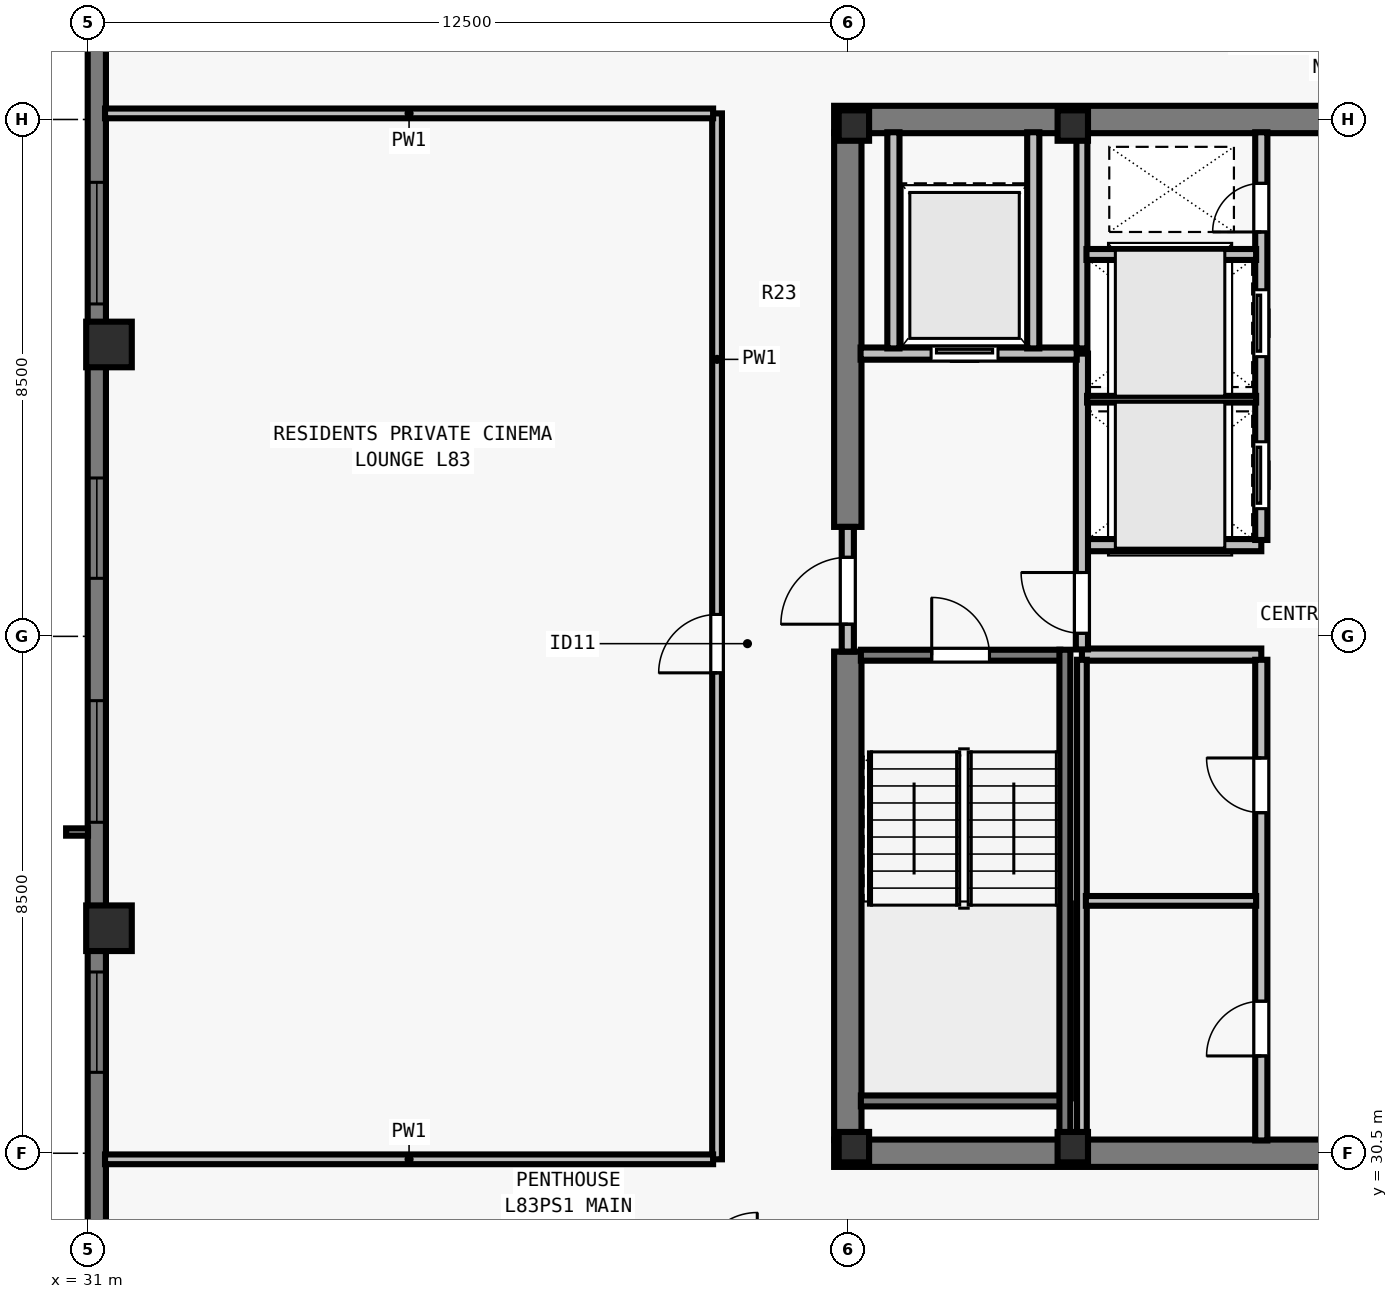
"""IFC4 building model, lengths in metres.
Left out: names, types, materials, properties, quantities, classifications, styles, units other than length and angle.
Written with IfcOpenShell. Run it as: python <this file> out.ifc"""

import sys

from ifc_helpers import new_model, si_unit, direction, frame, frame_2d, origin, origin_2d, place, context, subcontext, project, spatial, rectangle, i_section, extrude, element, fill, save


model = new_model("IFC4")
c1 = context("Model", 3, precision=1e-05, world=origin(), true_north=direction((0.0, 1.0)))
c2 = subcontext(c1, "Body", "Model", "MODEL_VIEW")
j1 = project(units=[si_unit("LENGTHUNIT", "METRE"), si_unit("PLANEANGLEUNIT", "RADIAN")], contexts=[c1])
p1 = place(None, origin())
s1 = spatial("IfcSite", under=j1, at=p1, CompositionType="ELEMENT")
p2 = place(p1, origin())
s2 = spatial("IfcBuilding", under=s1, at=p2, CompositionType="ELEMENT")
p3 = place(p2, frame((0.0, 0.0, 301.5)))
s3 = spatial("IfcBuildingStorey", under=s2, at=p3, CompositionType="ELEMENT", Elevation=301.5)
for number, where, z_axis, x_axis in (
    (1, (43.6, 30.6, 0.0), (0.0, 0.0, 1.0), (1.0, 0.0, 0.0)),
    (2, (47.2, 30.6, 0.0), (0.0, 0.0, 1.0), (1.0, 0.0, 0.0)),
    (3, (43.6, 47.4, 0.0), (0.0, 0.0, 1.0), (1.0, 0.0, 0.0)),
    (4, (47.2, 47.4, 0.0), (0.0, 0.0, 1.0), (1.0, 0.0, 0.0)),
):
    element("IfcColumn", number, at=place(p3, frame(where, z_axis=z_axis, x_axis=x_axis)), inside=s3, PredefinedType="COLUMN", context=c2, shape_type="SweptSolid", body=[
        extrude(i_section(OverallWidth=0.5, OverallDepth=0.5, WebThickness=0.028, FlangeThickness=0.045, at=origin_2d()), origin(), (0.0, 0.0, 1.0), 3.5),
    ])
for number, where, z_axis, x_axis in (
    (5, (31.35, 43.8, 0.0), (0.0, 0.0, 1.0), (0.0, 1.0, 0.0)),
    (6, (31.35, 34.2, 0.0), (0.0, 0.0, 1.0), (0.0, 1.0, 0.0)),
):
    element("IfcColumn", number, at=place(p3, frame(where, z_axis=z_axis, x_axis=x_axis)), inside=s3, PredefinedType="COLUMN", context=c2, shape_type="SweptSolid", body=[
        extrude(rectangle(XDim=0.75, YDim=0.75, at=origin_2d()), origin(), (0.0, 0.0, 1.0), 3.5),
    ])
p4 = place(p3, frame((31.15, 23.5, 0.0), z_axis=(0.0, 0.0, 1.0), x_axis=(0.0, 1.0, 0.0)))
e7 = element("IfcWall", 7, at=p4, inside=s3, PredefinedType="SOLIDWALL", context=c2, shape_type="SweptSolid", body=[
    extrude(rectangle(XDim=30.722, YDim=0.3, at=frame_2d((15.361, 0.0))), origin(), (0.0, 0.0, 1.0), 3.29),
])
p5 = place(p4, frame((8.331, 0.0, 0.8)))
e8 = element("IfcOpeningElement", 8, at=p5, cuts=e7, PredefinedType="OPENING", context=c2, shape_type="SweptSolid", body=[
    extrude(rectangle(XDim=1.65, YDim=1.758, at=frame_2d((0.825, 0.879))), frame((0.0, 0.16, 0.0), z_axis=(0.0, -1.0, 0.0), x_axis=(1.0, 0.0, 0.0)), (0.0, 0.0, 1.0), 0.32),
])
p6 = place(p4, frame((12.442, 0.0, 0.8)))
e9 = element("IfcOpeningElement", 9, at=p6, cuts=e7, PredefinedType="OPENING", context=c2, shape_type="SweptSolid", body=[
    extrude(rectangle(XDim=2.0, YDim=1.758, at=frame_2d((1.0, 0.879))), frame((0.0, 0.16, 0.0), z_axis=(0.0, -1.0, 0.0), x_axis=(1.0, 0.0, 0.0)), (0.0, 0.0, 1.0), 0.32),
])
p7 = place(p4, frame((16.455, 0.0, 0.8)))
e10 = element("IfcOpeningElement", 10, at=p7, cuts=e7, PredefinedType="OPENING", context=c2, shape_type="SweptSolid", body=[
    extrude(rectangle(XDim=1.65, YDim=1.758, at=frame_2d((0.825, 0.879))), frame((0.0, 0.16, 0.0), z_axis=(0.0, -1.0, 0.0), x_axis=(1.0, 0.0, 0.0)), (0.0, 0.0, 1.0), 0.32),
])
p8 = place(p4, frame((20.967, 0.0, 0.8)))
e11 = element("IfcOpeningElement", 11, at=p8, cuts=e7, PredefinedType="OPENING", context=c2, shape_type="SweptSolid", body=[
    extrude(rectangle(XDim=2.0, YDim=1.758, at=frame_2d((1.0, 0.879))), frame((0.0, 0.16, 0.0), z_axis=(0.0, -1.0, 0.0), x_axis=(1.0, 0.0, 0.0)), (0.0, 0.0, 1.0), 0.32),
])
for number, where, z_axis, x_axis in (
    (12, (43.275, 30.5, 0.0), (0.0, 0.0, 1.0), (1.0, 0.0, 0.0)),
    (13, (43.275, 47.5, 0.0), (0.0, 0.0, 1.0), (1.0, 0.0, 0.0)),
):
    element("IfcWall", number, at=place(p3, frame(where, z_axis=z_axis, x_axis=x_axis)), inside=s3, PredefinedType="SHEAR", context=c2, shape_type="SweptSolid", body=[
        extrude(rectangle(XDim=17.45, YDim=0.45, at=frame_2d((8.725, 0.0))), origin(), (0.0, 0.0, 1.0), 3.29),
    ])
p9 = place(p3, frame((43.5, 30.715, 0.0), z_axis=(0.0, 0.0, 1.0), x_axis=(0.0, 1.0, 0.0)))
e14 = element("IfcWall", 14, at=p9, inside=s3, PredefinedType="SHEAR", context=c2, shape_type="SweptSolid", body=[
    extrude(rectangle(XDim=8.035, YDim=0.45, at=frame_2d((4.018, 0.0))), origin(), (0.0, 0.0, 1.0), 3.29),
])
p10 = place(p3, frame((43.5, 40.8, 0.0), z_axis=(0.0, 0.0, 1.0), x_axis=(0.0, 1.0, 0.0)))
e15 = element("IfcWall", 15, at=p10, inside=s3, PredefinedType="SHEAR", context=c2, shape_type="SweptSolid", body=[
    extrude(rectangle(XDim=6.485, YDim=0.45, at=frame_2d((3.242, 0.0))), origin(), (0.0, 0.0, 1.0), 3.29),
])
for number, where, z_axis, x_axis in (
    (16, (47.35, 38.7, 0.0), (0.0, 0.0, 1.0), (1.0, 0.0, 0.0)),
    (17, (47.35, 40.5, 0.0), (0.0, 0.0, 1.0), (1.0, 0.0, 0.0)),
):
    element("IfcWall", number, at=place(p3, frame(where, z_axis=z_axis, x_axis=x_axis)), inside=s3, PredefinedType="SOLIDWALL", context=c2, shape_type="SweptSolid", body=[
        extrude(rectangle(XDim=2.95, YDim=0.2, at=frame_2d((1.475, 0.0))), origin(), (0.0, 0.0, 1.0), 3.29),
    ])
p11 = place(p3, frame((50.3, 30.71, 0.0), z_axis=(0.0, 0.0, 1.0), x_axis=(0.0, 1.0, 0.0)))
e18 = element("IfcWall", 18, at=p11, inside=s3, PredefinedType="SOLIDWALL", context=c2, shape_type="SweptSolid", body=[
    extrude(rectangle(XDim=7.905, YDim=0.2, at=frame_2d((3.953, 0.0))), origin(), (0.0, 0.0, 1.0), 3.29),
])
p12 = place(p11, frame((1.39, 0.0, 0.0)))
e19 = element("IfcOpeningElement", 19, at=p12, cuts=e18, PredefinedType="OPENING", context=c2, shape_type="SweptSolid", body=[
    extrude(rectangle(XDim=0.9, YDim=2.12, at=frame_2d((0.45, 1.06))), frame((0.0, 0.11, 0.0), z_axis=(0.0, -1.0, 0.0), x_axis=(1.0, 0.0, 0.0)), (0.0, 0.0, 1.0), 0.22),
])
p13 = place(p11, frame((5.39, 0.0, 0.0)))
e20 = element("IfcOpeningElement", 20, at=p13, cuts=e18, PredefinedType="OPENING", context=c2, shape_type="SweptSolid", body=[
    extrude(rectangle(XDim=0.9, YDim=2.12, at=frame_2d((0.45, 1.06))), frame((0.0, 0.11, 0.0), z_axis=(0.0, -1.0, 0.0), x_axis=(1.0, 0.0, 0.0)), (0.0, 0.0, 1.0), 0.22),
])
p14 = place(p3, frame((50.3, 40.585, 0.0), z_axis=(0.0, 0.0, 1.0), x_axis=(0.0, 1.0, 0.0)))
e21 = element("IfcWall", 21, at=p14, inside=s3, PredefinedType="SOLIDWALL", context=c2, shape_type="SweptSolid", body=[
    extrude(rectangle(XDim=6.705, YDim=0.2, at=frame_2d((3.353, 0.0))), origin(), (0.0, 0.0, 1.0), 3.29),
])
p15 = place(p14, frame((0.515, 0.0, 0.0)))
e22 = element("IfcOpeningElement", 22, at=p15, cuts=e21, PredefinedType="OPENING", context=c2, shape_type="SweptSolid", body=[
    extrude(rectangle(XDim=1.1, YDim=2.2, at=frame_2d((0.55, 1.1))), frame((0.0, 0.11, 0.0), z_axis=(0.0, -1.0, 0.0), x_axis=(1.0, 0.0, 0.0)), (0.0, 0.0, 1.0), 0.22),
])
p16 = place(p14, frame((3.015, 0.0, 0.0)))
e23 = element("IfcOpeningElement", 23, at=p16, cuts=e21, PredefinedType="OPENING", context=c2, shape_type="SweptSolid", body=[
    extrude(rectangle(XDim=1.1, YDim=2.2, at=frame_2d((0.55, 1.1))), frame((0.0, 0.11, 0.0), z_axis=(0.0, -1.0, 0.0), x_axis=(1.0, 0.0, 0.0)), (0.0, 0.0, 1.0), 0.22),
])
p17 = place(p14, frame((5.065, 0.0, 0.0)))
e24 = element("IfcOpeningElement", 24, at=p17, cuts=e21, PredefinedType="OPENING", context=c2, shape_type="SweptSolid", body=[
    extrude(rectangle(XDim=0.8, YDim=2.08, at=frame_2d((0.4, 1.04))), frame((0.0, 0.11, 0.0), z_axis=(0.0, -1.0, 0.0), x_axis=(1.0, 0.0, 0.0)), (0.0, 0.0, 1.0), 0.22),
])
p18 = place(p3, frame((43.5, 38.75, 0.0), z_axis=(0.0, 0.0, 1.0), x_axis=(0.0, 1.0, 0.0)))
e25 = element("IfcWall", 25, at=p18, inside=s3, PredefinedType="SOLIDWALL", context=c2, shape_type="SweptSolid", body=[
    extrude(rectangle(XDim=2.05, YDim=0.2, at=frame_2d((1.025, 0.0))), origin(), (0.0, 0.0, 1.0), 3.29),
])
p19 = place(p18, frame((0.45, 0.0, 0.0)))
e26 = element("IfcOpeningElement", 26, at=p19, cuts=e25, PredefinedType="OPENING", context=c2, shape_type="SweptSolid", body=[
    extrude(rectangle(XDim=1.1, YDim=2.15, at=frame_2d((0.55, 1.075))), frame((0.0, 0.11, 0.0), z_axis=(0.0, -1.0, 0.0), x_axis=(1.0, 0.0, 0.0)), (0.0, 0.0, 1.0), 0.22),
])
p20 = place(p3, frame((47.35, 38.785, 0.0), z_axis=(0.0, 0.0, 1.0), x_axis=(0.0, 1.0, 0.0)))
e27 = element("IfcWall", 27, at=p20, inside=s3, PredefinedType="SOLIDWALL", context=c2, shape_type="SweptSolid", body=[
    extrude(rectangle(XDim=4.865, YDim=0.2, at=frame_2d((2.433, 0.0))), origin(), (0.0, 0.0, 1.0), 3.29),
])
p21 = place(p20, frame((0.265, 0.0, 0.0)))
e28 = element("IfcOpeningElement", 28, at=p21, cuts=e27, PredefinedType="OPENING", context=c2, shape_type="SweptSolid", body=[
    extrude(rectangle(XDim=1.0, YDim=2.15, at=frame_2d((0.5, 1.075))), frame((0.0, 0.11, 0.0), z_axis=(0.0, -1.0, 0.0), x_axis=(1.0, 0.0, 0.0)), (0.0, 0.0, 1.0), 0.22),
])
p22 = place(p3, frame((43.71, 43.65, 0.0), z_axis=(0.0, 0.0, 1.0), x_axis=(1.0, 0.0, 0.0)))
e29 = element("IfcWall", 29, at=p22, inside=s3, PredefinedType="SOLIDWALL", context=c2, shape_type="SweptSolid", body=[
    extrude(rectangle(XDim=3.555, YDim=0.2, at=frame_2d((1.777, 0.0))), origin(), (0.0, 0.0, 1.0), 3.29),
])
p23 = place(p22, frame((1.16, 0.0, 0.0)))
e30 = element("IfcOpeningElement", 30, at=p23, cuts=e29, PredefinedType="OPENING", context=c2, shape_type="SweptSolid", body=[
    extrude(rectangle(XDim=1.1, YDim=2.2, at=frame_2d((0.55, 1.1))), frame((0.0, 0.11, 0.0), z_axis=(0.0, -1.0, 0.0), x_axis=(1.0, 0.0, 0.0)), (0.0, 0.0, 1.0), 0.22),
])
for number, where, z_axis, x_axis in (
    (31, (46.55, 43.735, 0.0), (0.0, 0.0, 1.0), (0.0, 1.0, 0.0)),
    (32, (44.25, 43.735, 0.0), (0.0, 0.0, 1.0), (0.0, 1.0, 0.0)),
):
    element("IfcWall", number, at=place(p3, frame(where, z_axis=z_axis, x_axis=x_axis)), inside=s3, PredefinedType="SOLIDWALL", context=c2, shape_type="SweptSolid", body=[
        extrude(rectangle(XDim=3.555, YDim=0.2, at=frame_2d((1.777, 0.0))), origin(), (0.0, 0.0, 1.0), 3.29),
    ])
p24 = place(p3, frame((47.35, 30.71, 0.0), z_axis=(0.0, 0.0, 1.0), x_axis=(0.0, 1.0, 0.0)))
e33 = element("IfcWall", 33, at=p24, inside=s3, PredefinedType="PARTITIONING", context=c2, shape_type="SweptSolid", body=[
    extrude(rectangle(XDim=7.905, YDim=0.16, at=frame_2d((3.953, 0.0))), origin(), (0.0, 0.0, 1.0), 3.29),
])
p25 = place(p3, frame((47.415, 34.65, 0.0), z_axis=(0.0, 0.0, 1.0), x_axis=(1.0, 0.0, 0.0)))
e34 = element("IfcWall", 34, at=p25, inside=s3, PredefinedType="PARTITIONING", context=c2, shape_type="SweptSolid", body=[
    extrude(rectangle(XDim=2.8, YDim=0.16, at=frame_2d((1.4, 0.0))), origin(), (0.0, 0.0, 1.0), 3.29),
])
p26 = place(p3, frame((47.35, 43.735, 0.0), z_axis=(0.0, 0.0, 1.0), x_axis=(0.0, 1.0, 0.0)))
e35 = element("IfcWall", 35, at=p26, inside=s3, PredefinedType="SOLIDWALL", context=c2, shape_type="SweptSolid", body=[
    extrude(rectangle(XDim=3.555, YDim=0.18, at=frame_2d((1.777, 0.0))), origin(), (0.0, 0.0, 1.0), 3.29),
])
p27 = place(p3, frame((47.435, 42.9, 0.0), z_axis=(0.0, 0.0, 1.0), x_axis=(1.0, 0.0, 0.0)))
e36 = element("IfcWall", 36, at=p27, inside=s3, PredefinedType="PARTITIONING", context=c2, shape_type="SweptSolid", body=[
    extrude(rectangle(XDim=2.78, YDim=0.11, at=frame_2d((1.39, 0.0))), origin(), (0.0, 0.0, 1.0), 3.29),
])
p28 = place(p3, frame((47.425, 45.28, 0.0), z_axis=(0.0, 0.0, 1.0), x_axis=(1.0, 0.0, 0.0)))
e37 = element("IfcWall", 37, at=p28, inside=s3, PredefinedType="SOLIDWALL", context=c2, shape_type="SweptSolid", body=[
    extrude(rectangle(XDim=2.79, YDim=0.18, at=frame_2d((1.395, 0.0))), origin(), (0.0, 0.0, 1.0), 3.29),
])
p29 = place(p3, frame((41.35, 30.4, 0.0), z_axis=(0.0, 0.0, 1.0), x_axis=(0.0, 1.0, 0.0)))
e38 = element("IfcWall", 38, at=p29, inside=s3, PredefinedType="PARTITIONING", context=c2, shape_type="SweptSolid", body=[
    extrude(rectangle(XDim=17.2, YDim=0.16, at=frame_2d((8.6, 0.0))), origin(), (0.0, 0.0, 1.0), 3.009),
])
p30 = place(p29, frame((8.0, 0.0, 0.0)))
e39 = element("IfcOpeningElement", 39, at=p30, cuts=e38, PredefinedType="OPENING", context=c2, shape_type="SweptSolid", body=[
    extrude(rectangle(XDim=0.96, YDim=2.12, at=frame_2d((0.48, 1.06))), frame((0.0, 0.09, 0.0), z_axis=(0.0, -1.0, 0.0), x_axis=(1.0, 0.0, 0.0)), (0.0, 0.0, 1.0), 0.18),
])
for number, where, z_axis, x_axis in (
    (40, (31.285, 30.4, 0.0), (0.0, 0.0, 1.0), (1.0, 0.0, 0.0)),
    (41, (31.285, 47.6, 0.0), (0.0, 0.0, 1.0), (1.0, 0.0, 0.0)),
):
    element("IfcWall", number, at=place(p3, frame(where, z_axis=z_axis, x_axis=x_axis)), inside=s3, PredefinedType="PARTITIONING", context=c2, shape_type="SweptSolid", body=[
        extrude(rectangle(XDim=10.0, YDim=0.16, at=frame_2d((5.0, 0.0))), origin(), (0.0, 0.0, 1.0), 3.29),
    ])
p31 = place(p3, frame((43.715, 38.69, 0.0), z_axis=(0.0, 0.0, 1.0), x_axis=(1.0, 0.0, 0.0)))
e42 = element("IfcWall", 42, at=p31, inside=s3, PredefinedType="SOLIDWALL", context=c2, shape_type="SweptSolid", body=[
    extrude(rectangle(XDim=3.28, YDim=0.18, at=frame_2d((1.64, 0.0))), origin(), (0.0, 0.0, 1.0), 3.29),
])
p32 = place(p31, frame((1.165, 0.0, 0.0)))
e43 = element("IfcOpeningElement", 43, at=p32, cuts=e42, PredefinedType="OPENING", context=c2, shape_type="SweptSolid", body=[
    extrude(rectangle(XDim=0.95, YDim=2.15, at=frame_2d((0.475, 1.075))), frame((0.0, 0.1, 0.0), z_axis=(0.0, -1.0, 0.0), x_axis=(1.0, 0.0, 0.0)), (0.0, 0.0, 1.0), 0.2),
])
p33 = place(p3, frame((43.715, 31.36, 0.0), z_axis=(0.0, 0.0, 1.0), x_axis=(1.0, 0.0, 0.0)))
e44 = element("IfcWall", 44, at=p33, inside=s3, PredefinedType="SOLIDWALL", context=c2, shape_type="SweptSolid", body=[
    extrude(rectangle(XDim=3.28, YDim=0.18, at=frame_2d((1.64, 0.0))), origin(), (0.0, 0.0, 1.0), 3.29),
])
p34 = place(p3, frame((47.07, 38.78, 0.0), z_axis=(0.0, 0.0, 1.0), x_axis=(0.0, -1.0, 0.0)))
e45 = element("IfcWall", 45, at=p34, inside=s3, PredefinedType="SOLIDWALL", context=c2, shape_type="SweptSolid", body=[
    extrude(rectangle(XDim=8.067, YDim=0.18, at=frame_2d((4.034, 0.0))), origin(), (0.0, 0.0, 1.0), 3.29),
])
p35 = place(p5, origin())
e46 = element("IfcWindow", 46, at=p35, inside=s3, PartitioningType="SINGLE_PANEL", PredefinedType="WINDOW", context=c2, shape_type="SweptSolid", body=[
    extrude(rectangle(XDim=1.65, YDim=1.758, at=frame_2d((0.825, 0.879))), frame((0.0, -0.05, 0.0), z_axis=(0.0, -1.0, 0.0), x_axis=(1.0, 0.0, 0.0)), (0.0, 0.0, 1.0), 0.06),
])
fill(e8, e46)
p36 = place(p6, origin())
e47 = element("IfcWindow", 47, at=p36, inside=s3, PartitioningType="SINGLE_PANEL", PredefinedType="WINDOW", context=c2, shape_type="SweptSolid", body=[
    extrude(rectangle(XDim=2.0, YDim=1.758, at=frame_2d((1.0, 0.879))), frame((0.0, -0.05, 0.0), z_axis=(0.0, -1.0, 0.0), x_axis=(1.0, 0.0, 0.0)), (0.0, 0.0, 1.0), 0.06),
])
fill(e9, e47)
p37 = place(p7, origin())
e48 = element("IfcWindow", 48, at=p37, inside=s3, PartitioningType="SINGLE_PANEL", PredefinedType="WINDOW", context=c2, shape_type="SweptSolid", body=[
    extrude(rectangle(XDim=1.65, YDim=1.758, at=frame_2d((0.825, 0.879))), frame((0.0, -0.05, 0.0), z_axis=(0.0, -1.0, 0.0), x_axis=(1.0, 0.0, 0.0)), (0.0, 0.0, 1.0), 0.06),
])
fill(e10, e48)
p38 = place(p8, origin())
e49 = element("IfcWindow", 49, at=p38, inside=s3, PartitioningType="SINGLE_PANEL", PredefinedType="WINDOW", context=c2, shape_type="SweptSolid", body=[
    extrude(rectangle(XDim=2.0, YDim=1.758, at=frame_2d((1.0, 0.879))), frame((0.0, -0.05, 0.0), z_axis=(0.0, -1.0, 0.0), x_axis=(1.0, 0.0, 0.0)), (0.0, 0.0, 1.0), 0.06),
])
fill(e11, e49)
p39 = place(p19, origin())
e50 = element("IfcDoor", 50, at=p39, inside=s3, OperationType="SINGLE_SWING_LEFT", PredefinedType="DOOR", context=c2, shape_type="SweptSolid", body=[
    extrude(rectangle(XDim=1.1, YDim=2.15, at=frame_2d((0.55, 1.075))), frame((0.0, 0.025, 0.0), z_axis=(0.0, -1.0, 0.0), x_axis=(1.0, 0.0, 0.0)), (0.0, 0.0, 1.0), 0.05),
])
fill(e26, e50)
p40 = place(p21, origin())
e51 = element("IfcDoor", 51, at=p40, inside=s3, OperationType="SINGLE_SWING_RIGHT", PredefinedType="DOOR", context=c2, shape_type="SweptSolid", body=[
    extrude(rectangle(XDim=1.0, YDim=2.15, at=frame_2d((0.5, 1.075))), frame((0.0, 0.025, 0.0), z_axis=(0.0, -1.0, 0.0), x_axis=(1.0, 0.0, 0.0)), (0.0, 0.0, 1.0), 0.05),
])
fill(e28, e51)
p41 = place(p23, origin())
e52 = element("IfcDoor", 52, at=p41, inside=s3, OperationType="SLIDING_TO_LEFT", PredefinedType="DOOR", context=c2, shape_type="SweptSolid", body=[
    extrude(rectangle(XDim=1.1, YDim=2.2, at=frame_2d((0.55, 1.1))), frame((0.0, 0.025, 0.0), z_axis=(0.0, -1.0, 0.0), x_axis=(1.0, 0.0, 0.0)), (0.0, 0.0, 1.0), 0.05),
])
fill(e30, e52)
p42 = place(p12, origin())
e53 = element("IfcDoor", 53, at=p42, inside=s3, OperationType="SINGLE_SWING_LEFT", PredefinedType="DOOR", context=c2, shape_type="SweptSolid", body=[
    extrude(rectangle(XDim=0.9, YDim=2.12, at=frame_2d((0.45, 1.06))), frame((0.0, 0.025, 0.0), z_axis=(0.0, -1.0, 0.0), x_axis=(1.0, 0.0, 0.0)), (0.0, 0.0, 1.0), 0.05),
])
fill(e19, e53)
p43 = place(p13, origin())
e54 = element("IfcDoor", 54, at=p43, inside=s3, OperationType="SINGLE_SWING_RIGHT", PredefinedType="DOOR", context=c2, shape_type="SweptSolid", body=[
    extrude(rectangle(XDim=0.9, YDim=2.12, at=frame_2d((0.45, 1.06))), frame((0.0, 0.025, 0.0), z_axis=(0.0, -1.0, 0.0), x_axis=(1.0, 0.0, 0.0)), (0.0, 0.0, 1.0), 0.05),
])
fill(e20, e54)
p44 = place(p15, origin())
e55 = element("IfcDoor", 55, at=p44, inside=s3, OperationType="SLIDING_TO_LEFT", PredefinedType="DOOR", context=c2, shape_type="SweptSolid", body=[
    extrude(rectangle(XDim=1.1, YDim=2.2, at=frame_2d((0.55, 1.1))), frame((0.0, 0.025, 0.0), z_axis=(0.0, -1.0, 0.0), x_axis=(1.0, 0.0, 0.0)), (0.0, 0.0, 1.0), 0.05),
])
fill(e22, e55)
p45 = place(p16, origin())
e56 = element("IfcDoor", 56, at=p45, inside=s3, OperationType="SLIDING_TO_LEFT", PredefinedType="DOOR", context=c2, shape_type="SweptSolid", body=[
    extrude(rectangle(XDim=1.1, YDim=2.2, at=frame_2d((0.55, 1.1))), frame((0.0, 0.025, 0.0), z_axis=(0.0, -1.0, 0.0), x_axis=(1.0, 0.0, 0.0)), (0.0, 0.0, 1.0), 0.05),
])
fill(e23, e56)
p46 = place(p17, origin())
e57 = element("IfcDoor", 57, at=p46, inside=s3, OperationType="SINGLE_SWING_LEFT", PredefinedType="DOOR", context=c2, shape_type="SweptSolid", body=[
    extrude(rectangle(XDim=0.8, YDim=2.08, at=frame_2d((0.4, 1.04))), frame((0.0, 0.025, 0.0), z_axis=(0.0, -1.0, 0.0), x_axis=(1.0, 0.0, 0.0)), (0.0, 0.0, 1.0), 0.05),
])
fill(e24, e57)
p47 = place(p30, origin())
e58 = element("IfcDoor", 58, at=p47, inside=s3, OperationType="SINGLE_SWING_LEFT", PredefinedType="DOOR", context=c2, shape_type="SweptSolid", body=[
    extrude(rectangle(XDim=0.96, YDim=2.12, at=frame_2d((0.48, 1.06))), frame((0.0, 0.025, 0.0), z_axis=(0.0, -1.0, 0.0), x_axis=(1.0, 0.0, 0.0)), (0.0, 0.0, 1.0), 0.05),
])
fill(e39, e58)
p48 = place(p32, origin())
e59 = element("IfcDoor", 59, at=p48, inside=s3, OperationType="SINGLE_SWING_LEFT", PredefinedType="DOOR", context=c2, shape_type="SweptSolid", body=[
    extrude(rectangle(XDim=0.95, YDim=2.15, at=frame_2d((0.475, 1.075))), frame((0.0, 0.025, 0.0), z_axis=(0.0, -1.0, 0.0), x_axis=(1.0, 0.0, 0.0)), (0.0, 0.0, 1.0), 0.05),
])
fill(e43, e59)
save(model, sys.argv[1])
